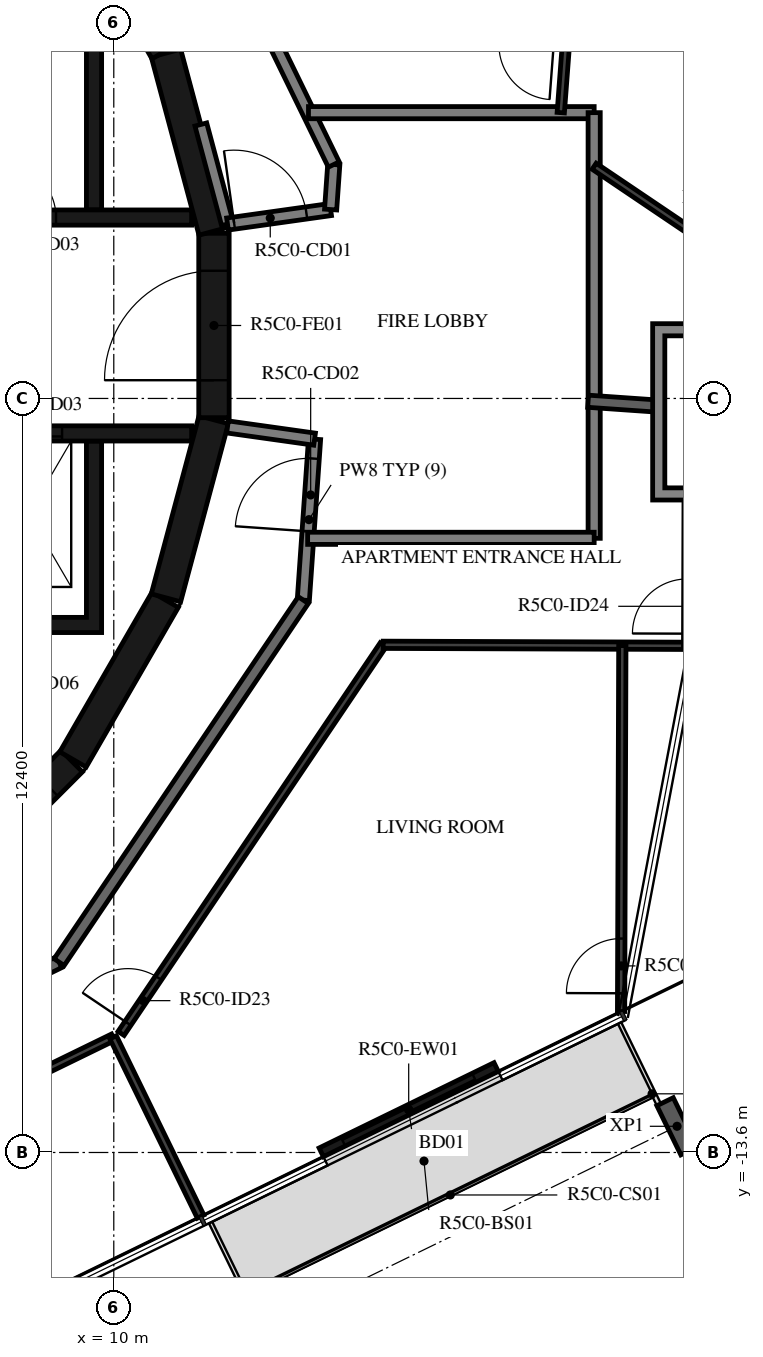
"""IFC4 building model, lengths in metres.
Left out: names, types, materials, properties, quantities, classifications, styles, units other than length and angle.
Written with IfcOpenShell. Run it as: python <this file> out.ifc"""

import sys

from ifc_helpers import new_model, si_unit, direction, frame, frame_2d, origin, origin_2d, place, context, subcontext, project, spatial, polyline, rectangle, i_section, outline, extrude, element, fill, save


model = new_model("IFC4")
c1 = context("Model", 3, precision=1e-05, world=origin(), true_north=direction((0.0, 1.0)))
c2 = subcontext(c1, "Body", "Model", "MODEL_VIEW")
j1 = project(units=[si_unit("LENGTHUNIT", "METRE"), si_unit("PLANEANGLEUNIT", "RADIAN")], contexts=[c1])
p1 = place(None, origin())
s1 = spatial("IfcSite", under=j1, at=p1, CompositionType="ELEMENT")
p2 = place(p1, origin())
s2 = spatial("IfcBuilding", under=s1, at=p2, CompositionType="ELEMENT")
p3 = place(p2, frame((0.0, 0.0, 216.4)))
s3 = spatial("IfcBuildingStorey", under=s2, at=p3, CompositionType="ELEMENT", Elevation=216.4)
p4 = place(p3, frame((19.263, -13.169, -0.38), z_axis=(0.0, 0.0, 1.0), x_axis=(-0.898794095235, -0.438371046456, 0.0)))
e1 = element("IfcColumn", 1, at=p4, inside=s3, PredefinedType="COLUMN", context=c2, shape_type="SweptSolid", body=[
    extrude(i_section(OverallWidth=0.3, OverallDepth=0.9, WebThickness=0.019, FlangeThickness=0.035, FilletRadius=0.03, at=origin_2d()), origin(), (0.0, 0.0, 1.0), 2.616),
])
p5 = place(p3, frame((13.412, -13.598, 0.0), z_axis=(0.0, 0.0, 1.0), x_axis=(0.898793373747, 0.438372525723, 0.0)))
e2 = element("IfcWall", 2, at=p5, inside=s3, PredefinedType="STANDARD", context=c2, shape_type="SweptSolid", body=[
    extrude(rectangle(XDim=3.2, YDim=0.16, at=frame_2d((1.6, 0.0))), origin(), (0.0, 0.0, 1.0), 3.05),
])
p6 = place(p5, frame((0.4, 0.0, 0.0)))
e3 = element("IfcOpeningElement", 3, at=p6, cuts=e2, PredefinedType="OPENING", context=c2, shape_type="SweptSolid", body=[
    extrude(rectangle(XDim=2.4, YDim=2.4, at=frame_2d((1.2, 1.2))), frame((0.0, 0.09, 0.0), z_axis=(0.0, -1.0, 0.0), x_axis=(1.0, 0.0, 0.0)), (0.0, 0.0, 1.0), 0.18),
])
p7 = place(p3, frame((7.164, -9.308, 0.0), z_axis=(0.0, 0.0, 1.0), x_axis=(0.707106781187, 0.707106781187, 0.0)))
e4 = element("IfcWall", 4, at=p7, inside=s3, PredefinedType="SHEAR", context=c2, shape_type="SweptSolid", body=[
    extrude(rectangle(XDim=3.032, YDim=0.5, at=frame_2d((1.516, 0.0))), origin(), (0.0, 0.0, 1.0), 3.05),
])
p8 = place(p7, frame((1.566, 0.0, 0.0)))
e5 = element("IfcOpeningElement", 5, at=p8, cuts=e4, PredefinedType="OPENING", context=c2, shape_type="SweptSolid", body=[
    extrude(rectangle(XDim=0.9, YDim=2.1, at=frame_2d((0.45, 1.05))), frame((0.0, 0.26, 0.0), z_axis=(0.0, -1.0, 0.0), x_axis=(1.0, 0.0, 0.0)), (0.0, 0.0, 1.0), 0.52),
])
for number, where, z_axis, x_axis in (
    (6, (9.329, -7.137, 0.0), (0.0, 0.0, 1.0), (0.5, 0.866, 0.0)),
    (7, (10.858, -4.479, 0.0), (0.0, 0.0, 1.0), (0.259, 0.966, 0.0)),
):
    element("IfcWall", number, at=place(p3, frame(where, z_axis=z_axis, x_axis=x_axis)), inside=s3, PredefinedType="SHEAR", context=c2, shape_type="SweptSolid", body=[
        extrude(rectangle(XDim=3.033, YDim=0.5, at=frame_2d((1.516, 0.0))), origin(), (0.0, 0.0, 1.0), 3.05),
    ])
p9 = place(p3, frame((11.647, -1.516, 0.0), z_axis=(0.0, 0.0, 1.0), x_axis=(0.0, 1.0, 0.0)))
e8 = element("IfcWall", 8, at=p9, inside=s3, PredefinedType="SHEAR", context=c2, shape_type="SweptSolid", body=[
    extrude(rectangle(XDim=3.033, YDim=0.5, at=frame_2d((1.516, 0.0))), origin(), (0.0, 0.0, 1.0), 3.05),
])
p10 = place(p9, frame((0.616, 0.0, 0.0)))
e9 = element("IfcOpeningElement", 9, at=p10, cuts=e8, PredefinedType="OPENING", context=c2, shape_type="SweptSolid", body=[
    extrude(rectangle(XDim=1.8, YDim=2.1, at=frame_2d((0.9, 1.05))), frame((0.0, 0.26, 0.0), z_axis=(0.0, -1.0, 0.0), x_axis=(1.0, 0.0, 0.0)), (0.0, 0.0, 1.0), 0.52),
])
for number, where, z_axis, x_axis in (
    (10, (11.643, 1.55, 0.0), (0.0, 0.0, 1.0), (-0.259, 0.966, 0.0)),
    (11, (10.845, 4.51, 0.0), (0.0, 0.0, 1.0), (-0.5, 0.866, 0.0)),
):
    element("IfcWall", number, at=place(p3, frame(where, z_axis=z_axis, x_axis=x_axis)), inside=s3, PredefinedType="SHEAR", context=c2, shape_type="SweptSolid", body=[
        extrude(rectangle(XDim=3.033, YDim=0.5, at=frame_2d((1.516, 0.0))), origin(), (0.0, 0.0, 1.0), 3.05),
    ])
p11 = place(p3, origin())
e12 = element("IfcWall", 12, at=p11, inside=s3, PredefinedType="SHEAR", context=c2, shape_type="SweptSolid", body=[
    extrude(outline(polyline([(-9.55, 4.8), (-5.5, 4.8), (-5.5, 1.9), (-5.25, 1.9), (-5.25, 4.8), (-1.2, 4.8), (-1.2, 1.9), (-0.95, 1.9), (-0.95, 4.8), (0.95, 4.8), (0.95, 1.9), (1.2, 1.9), (1.2, 4.8), (3.1, 4.8), (3.1, 1.9), (3.35, 1.9), (3.35, 4.8), (5.25, 4.8), (5.25, 1.9), (5.5, 1.9), (5.5, 4.8), (7.4, 4.8), (7.4, 1.9), (7.65, 1.9), (7.65, 4.8), (9.55, 4.8), (9.55, 1.9), (9.8, 1.9), (9.8, 4.8), (9.8, 5.05), (-9.8, 5.05), (-9.8, 4.8), (-9.8, 1.9), (-9.55, 1.9), (-9.55, 4.8)])), origin(), (0.0, 0.0, 1.0), 3.05),
])
p12 = place(p3, origin())
e13 = element("IfcWall", 13, at=p12, inside=s3, PredefinedType="SHEAR", context=c2, shape_type="SweptSolid", body=[
    extrude(outline(polyline([(9.8, -5.05), (9.8, -4.8), (9.8, -1.9), (9.55, -1.9), (9.55, -4.8), (7.65, -4.8), (7.65, -1.9), (7.4, -1.9), (7.4, -4.8), (5.5, -4.8), (5.5, -1.9), (5.25, -1.9), (5.25, -4.8), (3.35, -4.8), (3.35, -1.9), (3.1, -1.9), (3.1, -4.8), (1.2, -4.8), (1.2, -1.9), (0.95, -1.9), (0.95, -4.8), (-5.25, -4.8), (-5.25, -1.9), (-5.5, -1.9), (-5.5, -4.8), (-7.4, -4.8), (-7.4, -1.9), (-7.65, -1.9), (-7.65, -4.8), (-9.55, -4.8), (-9.55, -1.9), (-9.8, -1.9), (-9.8, -4.8), (-9.8, -5.05), (9.8, -5.05)])), origin(), (0.0, 0.0, 1.0), 3.05),
])
p13 = place(p3, frame((3.35, 1.775, 0.0), z_axis=(0.0, 0.0, 1.0), x_axis=(1.0, 0.0, 0.0)))
e14 = element("IfcWall", 14, at=p13, inside=s3, PredefinedType="SHEAR", context=c2, shape_type="SweptSolid", body=[
    extrude(rectangle(XDim=7.93, YDim=0.25, at=frame_2d((3.965, 0.0))), origin(), (0.0, 0.0, 1.0), 3.05),
])
p14 = place(p13, frame((0.35, 0.0, 0.0)))
e15 = element("IfcOpeningElement", 15, at=p14, cuts=e14, PredefinedType="OPENING", context=c2, shape_type="SweptSolid", body=[
    extrude(rectangle(XDim=1.2, YDim=2.4, at=frame_2d((0.6, 1.2))), frame((0.0, 0.135, 0.0), z_axis=(0.0, -1.0, 0.0), x_axis=(1.0, 0.0, 0.0)), (0.0, 0.0, 1.0), 0.27),
])
p15 = place(p13, frame((2.5, 0.0, 0.0)))
e16 = element("IfcOpeningElement", 16, at=p15, cuts=e14, PredefinedType="OPENING", context=c2, shape_type="SweptSolid", body=[
    extrude(rectangle(XDim=1.2, YDim=2.4, at=frame_2d((0.6, 1.2))), frame((0.0, 0.135, 0.0), z_axis=(0.0, -1.0, 0.0), x_axis=(1.0, 0.0, 0.0)), (0.0, 0.0, 1.0), 0.27),
])
p16 = place(p13, frame((4.8, 0.0, 0.0)))
e17 = element("IfcOpeningElement", 17, at=p16, cuts=e14, PredefinedType="OPENING", context=c2, shape_type="SweptSolid", body=[
    extrude(rectangle(XDim=0.9, YDim=2.1, at=frame_2d((0.45, 1.05))), frame((0.0, 0.135, 0.0), z_axis=(0.0, -1.0, 0.0), x_axis=(1.0, 0.0, 0.0)), (0.0, 0.0, 1.0), 0.27),
])
p17 = place(p3, frame((3.35, -1.775, 0.0), z_axis=(0.0, 0.0, 1.0), x_axis=(1.0, 0.0, 0.0)))
e18 = element("IfcWall", 18, at=p17, inside=s3, PredefinedType="SHEAR", context=c2, shape_type="SweptSolid", body=[
    extrude(rectangle(XDim=7.93, YDim=0.25, at=frame_2d((3.965, 0.0))), origin(), (0.0, 0.0, 1.0), 3.05),
])
p18 = place(p17, frame((0.4, 0.0, 0.0)))
e19 = element("IfcOpeningElement", 19, at=p18, cuts=e18, PredefinedType="OPENING", context=c2, shape_type="SweptSolid", body=[
    extrude(rectangle(XDim=1.1, YDim=2.4, at=frame_2d((0.55, 1.2))), frame((0.0, 0.135, 0.0), z_axis=(0.0, -1.0, 0.0), x_axis=(1.0, 0.0, 0.0)), (0.0, 0.0, 1.0), 0.27),
])
p19 = place(p17, frame((2.55, 0.0, 0.0)))
e20 = element("IfcOpeningElement", 20, at=p19, cuts=e18, PredefinedType="OPENING", context=c2, shape_type="SweptSolid", body=[
    extrude(rectangle(XDim=1.1, YDim=2.4, at=frame_2d((0.55, 1.2))), frame((0.0, 0.135, 0.0), z_axis=(0.0, -1.0, 0.0), x_axis=(1.0, 0.0, 0.0)), (0.0, 0.0, 1.0), 0.27),
])
p20 = place(p17, frame((4.7, 0.0, 0.0)))
e21 = element("IfcOpeningElement", 21, at=p20, cuts=e18, PredefinedType="OPENING", context=c2, shape_type="SweptSolid", body=[
    extrude(rectangle(XDim=1.1, YDim=2.4, at=frame_2d((0.55, 1.2))), frame((0.0, 0.135, 0.0), z_axis=(0.0, -1.0, 0.0), x_axis=(1.0, 0.0, 0.0)), (0.0, 0.0, 1.0), 0.27),
])
p21 = place(p3, frame((11.87, 1.668, 0.0), z_axis=(0.0, 0.0, 1.0), x_axis=(-0.258836880648, 0.965921047093, 0.0)))
e22 = element("IfcWall", 22, at=p21, inside=s3, PredefinedType="STANDARD", context=c2, shape_type="SweptSolid", body=[
    extrude(rectangle(XDim=1.695, YDim=0.2, at=frame_2d((0.848, 0.0))), origin(), (0.0, 0.0, 1.0), 3.05),
])
p22 = place(p3, frame((11.87, 1.668, 0.0), z_axis=(0.0, 0.0, 1.0), x_axis=(0.990271931984, 0.139145609792, 0.0)))
e23 = element("IfcWall", 23, at=p22, inside=s3, PredefinedType="STANDARD", context=c2, shape_type="SweptSolid", body=[
    extrude(rectangle(XDim=1.712, YDim=0.2, at=frame_2d((0.856, 0.0))), origin(), (0.0, 0.0, 1.0), 3.05),
])
p23 = place(p22, frame((0.11, 0.0, 0.0)))
e24 = element("IfcOpeningElement", 24, at=p23, cuts=e23, PredefinedType="OPENING", context=c2, shape_type="SweptSolid", body=[
    extrude(rectangle(XDim=1.2, YDim=2.1, at=frame_2d((0.6, 1.05))), frame((0.0, 0.11, 0.0), z_axis=(0.0, -1.0, 0.0), x_axis=(1.0, 0.0, 0.0)), (0.0, 0.0, 1.0), 0.22),
])
p24 = place(p3, frame((13.566, 1.906, 0.0), z_axis=(0.0, 0.0, 1.0), x_axis=(0.07005495793, 0.997543133338, 0.0)))
e25 = element("IfcWall", 25, at=p24, inside=s3, PredefinedType="STANDARD", context=c2, shape_type="SweptSolid", body=[
    extrude(rectangle(XDim=0.742, YDim=0.2, at=frame_2d((0.371, 0.0))), origin(), (0.0, 0.0, 1.0), 3.05),
])
p25 = place(p3, frame((13.618, 2.647, 0.0), z_axis=(0.0, 0.0, 1.0), x_axis=(-0.438366026218, 0.898796543751, 0.0)))
e26 = element("IfcWall", 26, at=p25, inside=s3, PredefinedType="STANDARD", context=c2, shape_type="SweptSolid", body=[
    extrude(rectangle(XDim=7.181, YDim=0.2, at=frame_2d((3.591, 0.0))), origin(), (0.0, 0.0, 1.0), 3.05),
])
p26 = place(p3, frame((13.117, -4.517, 0.0), z_axis=(0.0, 0.0, 1.0), x_axis=(0.069736659613, 0.997565435601, 0.0)))
e27 = element("IfcWall", 27, at=p26, inside=s3, PredefinedType="STANDARD", context=c2, shape_type="SweptSolid", body=[
    extrude(rectangle(XDim=2.654, YDim=0.2, at=frame_2d((1.327, 0.0))), origin(), (0.0, 0.0, 1.0), 3.05),
])
p27 = place(p26, frame((1.134, 0.0, 0.0)))
e28 = element("IfcOpeningElement", 28, at=p27, cuts=e27, PredefinedType="OPENING", context=c2, shape_type="SweptSolid", body=[
    extrude(rectangle(XDim=1.2, YDim=2.1, at=frame_2d((0.6, 1.05))), frame((0.0, 0.11, 0.0), z_axis=(0.0, -1.0, 0.0), x_axis=(1.0, 0.0, 0.0)), (0.0, 0.0, 1.0), 0.22),
])
p28 = place(p3, frame((13.302, -1.869, 0.0), z_axis=(0.0, 0.0, 1.0), x_axis=(-0.990274397042, 0.13912806533, 0.0)))
e29 = element("IfcWall", 29, at=p28, inside=s3, PredefinedType="STANDARD", context=c2, shape_type="SweptSolid", body=[
    extrude(rectangle(XDim=1.446, YDim=0.2, at=frame_2d((0.723, 0.0))), origin(), (0.0, 0.0, 1.0), 3.05),
])
p29 = place(p3, frame((2.647, -13.618, 0.0), z_axis=(0.0, 0.0, 1.0), x_axis=(0.898796543751, 0.438366026218, 0.0)))
e30 = element("IfcWall", 30, at=p29, inside=s3, PredefinedType="STANDARD", context=c2, shape_type="SweptSolid", body=[
    extrude(rectangle(XDim=7.181, YDim=0.2, at=frame_2d((3.591, 0.0))), origin(), (0.0, 0.0, 1.0), 3.05),
])
p30 = place(p29, frame((0.2, 0.0, 0.0)))
e31 = element("IfcOpeningElement", 31, at=p30, cuts=e30, PredefinedType="OPENING", context=c2, shape_type="SweptSolid", body=[
    extrude(rectangle(XDim=1.0, YDim=2.1, at=frame_2d((0.5, 1.05))), frame((0.0, 0.11, 0.0), z_axis=(0.0, -1.0, 0.0), x_axis=(1.0, 0.0, 0.0)), (0.0, 0.0, 1.0), 0.22),
])
p31 = place(p3, frame((9.101, -10.47, 0.0), z_axis=(0.0, 0.0, 1.0), x_axis=(0.559195469534, 0.829035841718, 0.0)))
e32 = element("IfcWall", 32, at=p31, inside=s3, PredefinedType="STANDARD", context=c2, shape_type="SweptSolid", body=[
    extrude(rectangle(XDim=7.181, YDim=0.2, at=frame_2d((3.591, 0.0))), origin(), (0.0, 0.0, 1.0), 3.05),
])
p32 = place(p3, frame((17.9, 3.5, 0.0), z_axis=(0.0, 0.0, 1.0), x_axis=(-1.0, 0.0, 0.0)))
e33 = element("IfcWall", 33, at=p32, inside=s3, PredefinedType="STANDARD", context=c2, shape_type="SweptSolid", body=[
    extrude(rectangle(XDim=4.698, YDim=0.2, at=frame_2d((2.349, 0.0))), origin(), (0.0, 0.0, 1.0), 3.05),
])
p33 = place(p3, frame((17.9, -3.5, 0.0), z_axis=(0.0, 0.0, 1.0), x_axis=(0.0, 1.0, 0.0)))
e34 = element("IfcWall", 34, at=p33, inside=s3, PredefinedType="STANDARD", context=c2, shape_type="SweptSolid", body=[
    extrude(rectangle(XDim=7.0, YDim=0.2, at=frame_2d((3.5, 0.0))), origin(), (0.0, 0.0, 1.0), 3.05),
])
p34 = place(p3, frame((13.188, -3.5, 0.0), z_axis=(0.0, 0.0, 1.0), x_axis=(1.0, 0.0, 0.0)))
e35 = element("IfcWall", 35, at=p34, inside=s3, PredefinedType="STANDARD", context=c2, shape_type="SweptSolid", body=[
    extrude(rectangle(XDim=4.712, YDim=0.2, at=frame_2d((2.356, 0.0))), origin(), (0.0, 0.0, 1.0), 3.05),
])
p35 = place(p3, frame((17.8, -1.246, 0.0), z_axis=(0.0, 0.0, 1.0), x_axis=(0.997562681713, -0.069776042122, 0.0)))
e36 = element("IfcWall", 36, at=p35, inside=s3, PredefinedType="STANDARD", context=c2, shape_type="SweptSolid", body=[
    extrude(rectangle(XDim=1.144, YDim=0.2, at=frame_2d((0.572, 0.0))), origin(), (0.0, 0.0, 1.0), 3.05),
])
p36 = place(p3, frame((17.351, 3.5, 0.0), z_axis=(0.0, 0.0, 1.0), x_axis=(0.075374124137, 0.997155324616, 0.0)))
e37 = element("IfcWall", 37, at=p36, inside=s3, PredefinedType="PARTITIONING", context=c2, shape_type="SweptSolid", body=[
    extrude(rectangle(XDim=1.101, YDim=0.12, at=frame_2d((0.551, 0.0))), origin(), (0.0, 0.0, 1.0), 3.05),
])
p37 = place(p3, frame((21.141, 0.433, 0.0), z_axis=(0.0, 0.0, 1.0), x_axis=(-0.829049908454, 0.559174614313, 0.0)))
e38 = element("IfcWall", 38, at=p37, inside=s3, PredefinedType="PARTITIONING", context=c2, shape_type="SweptSolid", body=[
    extrude(rectangle(XDim=3.909, YDim=0.12, at=frame_2d((1.955, 0.0))), origin(), (0.0, 0.0, 1.0), 3.05),
])
p38 = place(p37, frame((0.8, 0.0, 0.0)))
e39 = element("IfcOpeningElement", 39, at=p38, cuts=e38, PredefinedType="OPENING", context=c2, shape_type="SweptSolid", body=[
    extrude(rectangle(XDim=0.8, YDim=2.1, at=frame_2d((0.4, 1.05))), frame((0.0, 0.07, 0.0), z_axis=(0.0, -1.0, 0.0), x_axis=(1.0, 0.0, 0.0)), (0.0, 0.0, 1.0), 0.14),
])
p39 = place(p3, frame((3.074, -15.078, 0.0), z_axis=(0.0, 0.0, 1.0), x_axis=(0.898800770739, 0.438357359377, 0.0)))
e40 = element("IfcWall", 40, at=p39, inside=s3, PredefinedType="PARTITIONING", context=c2, shape_type="SweptSolid", body=[
    extrude(rectangle(XDim=7.694, YDim=0.12, at=frame_2d((3.847, 0.0))), origin(), (0.0, 0.0, 1.0), 3.05),
])
p40 = place(p39, frame((0.2, 0.0, 0.0)))
e41 = element("IfcOpeningElement", 41, at=p40, cuts=e40, PredefinedType="OPENING", context=c2, shape_type="SweptSolid", body=[
    extrude(rectangle(XDim=0.9, YDim=2.1, at=frame_2d((0.45, 1.05))), frame((0.0, 0.07, 0.0), z_axis=(0.0, -1.0, 0.0), x_axis=(1.0, 0.0, 0.0)), (0.0, 0.0, 1.0), 0.14),
])
p41 = place(p3, frame((10.12, -11.642, 0.0), z_axis=(0.0, 0.0, 1.0), x_axis=(0.559201404667, 0.829031838362, 0.0)))
e42 = element("IfcWall", 42, at=p41, inside=s3, PredefinedType="PARTITIONING", context=c2, shape_type="SweptSolid", body=[
    extrude(rectangle(XDim=7.709, YDim=0.12, at=frame_2d((3.854, 0.0))), origin(), (0.0, 0.0, 1.0), 3.05),
])
p42 = place(p41, frame((0.2, 0.0, 0.0)))
e43 = element("IfcOpeningElement", 43, at=p42, cuts=e42, PredefinedType="OPENING", context=c2, shape_type="SweptSolid", body=[
    extrude(rectangle(XDim=0.9, YDim=2.1, at=frame_2d((0.45, 1.05))), frame((0.0, 0.07, 0.0), z_axis=(0.0, -1.0, 0.0), x_axis=(1.0, 0.0, 0.0)), (0.0, 0.0, 1.0), 0.14),
])
p43 = place(p3, frame((14.431, -5.251, 0.0), z_axis=(0.0, 0.0, 1.0), x_axis=(0.999994153659, -0.003419451456, 0.0)))
e44 = element("IfcWall", 44, at=p43, inside=s3, PredefinedType="PARTITIONING", context=c2, shape_type="SweptSolid", body=[
    extrude(rectangle(XDim=4.998, YDim=0.12, at=frame_2d((2.499, 0.0))), origin(), (0.0, 0.0, 1.0), 3.05),
])
p44 = place(p3, frame((11.427, -14.654, 0.0), z_axis=(0.0, 0.0, 1.0), x_axis=(-0.438410435857, 0.898774882677, 0.0)))
e45 = element("IfcWall", 45, at=p44, inside=s3, PredefinedType="PARTITIONING", context=c2, shape_type="SweptSolid", body=[
    extrude(rectangle(XDim=3.281, YDim=0.12, at=frame_2d((1.64, 0.0))), origin(), (0.0, 0.0, 1.0), 3.05),
])
p45 = place(p3, frame((18.343, -11.282, 0.0), z_axis=(0.0, 0.0, 1.0), x_axis=(0.003448675073, 0.999994053302, 0.0)))
e46 = element("IfcWall", 46, at=p45, inside=s3, PredefinedType="PARTITIONING", context=c2, shape_type="SweptSolid", body=[
    extrude(rectangle(XDim=6.017, YDim=0.12, at=frame_2d((3.009, 0.0))), origin(), (0.0, 0.0, 1.0), 3.05),
])
p46 = place(p45, frame((0.3, 0.0, 0.0)))
e47 = element("IfcOpeningElement", 47, at=p46, cuts=e46, PredefinedType="OPENING", context=c2, shape_type="SweptSolid", body=[
    extrude(rectangle(XDim=0.9, YDim=2.1, at=frame_2d((0.45, 1.05))), frame((0.0, 0.07, 0.0), z_axis=(0.0, -1.0, 0.0), x_axis=(1.0, 0.0, 0.0)), (0.0, 0.0, 1.0), 0.14),
])
p47 = place(p3, origin())
e48 = element("IfcWall", 48, at=p47, inside=s3, PredefinedType="STANDARD", context=c2, shape_type="SweptSolid", body=[
    extrude(outline(polyline([(21.762, 0.03), (21.762, -2.87), (18.862, -2.87), (18.862, 0.03), (21.762, 0.03)]), holes=[polyline([(19.062, -2.67), (21.562, -2.67), (21.562, -0.17), (19.062, -0.17), (19.062, -2.67)])]), origin(), (0.0, 0.0, 1.0), 3.05),
])
p48 = place(p6, origin())
e49 = element("IfcDoor", 49, at=p48, inside=s3, OperationType="DOUBLE_DOOR_SLIDING", PredefinedType="DOOR", context=c2, shape_type="SweptSolid", body=[
    extrude(rectangle(XDim=2.4, YDim=2.4, at=frame_2d((1.2, 1.2))), frame((0.0, 0.025, 0.0), z_axis=(0.0, -1.0, 0.0), x_axis=(1.0, 0.0, 0.0)), (0.0, 0.0, 1.0), 0.05),
])
fill(e3, e49)
p49 = place(p10, origin())
e50 = element("IfcDoor", 50, at=p49, inside=s3, OperationType="DOUBLE_DOOR_SINGLE_SWING", PredefinedType="DOOR", context=c2, shape_type="SweptSolid", body=[
    extrude(rectangle(XDim=1.8, YDim=2.1, at=frame_2d((0.9, 1.05))), frame((0.0, 0.025, 0.0), z_axis=(0.0, -1.0, 0.0), x_axis=(1.0, 0.0, 0.0)), (0.0, 0.0, 1.0), 0.05),
])
fill(e9, e50)
p50 = place(p20, origin())
e51 = element("IfcDoor", 51, at=p50, inside=s3, OperationType="DOUBLE_DOOR_SLIDING", PredefinedType="DOOR", context=c2, shape_type="SweptSolid", body=[
    extrude(rectangle(XDim=1.1, YDim=2.4, at=frame_2d((0.55, 1.2))), frame((0.0, 0.025, 0.0), z_axis=(0.0, -1.0, 0.0), x_axis=(1.0, 0.0, 0.0)), (0.0, 0.0, 1.0), 0.05),
])
fill(e21, e51)
p51 = place(p16, origin())
e52 = element("IfcDoor", 52, at=p51, inside=s3, OperationType="SINGLE_SWING_LEFT", PredefinedType="DOOR", context=c2, shape_type="SweptSolid", body=[
    extrude(rectangle(XDim=0.9, YDim=2.1, at=frame_2d((0.45, 1.05))), frame((0.0, 0.025, 0.0), z_axis=(0.0, -1.0, 0.0), x_axis=(1.0, 0.0, 0.0)), (0.0, 0.0, 1.0), 0.05),
])
fill(e17, e52)
p52 = place(p42, origin())
e53 = element("IfcDoor", 53, at=p52, inside=s3, OperationType="SINGLE_SWING_RIGHT", PredefinedType="DOOR", context=c2, shape_type="SweptSolid", body=[
    extrude(rectangle(XDim=0.9, YDim=2.1, at=frame_2d((0.45, 1.05))), frame((0.0, 0.025, 0.0), z_axis=(0.0, -1.0, 0.0), x_axis=(1.0, 0.0, 0.0)), (0.0, 0.0, 1.0), 0.05),
])
fill(e43, e53)
p53 = place(p46, origin())
e54 = element("IfcDoor", 54, at=p53, inside=s3, OperationType="SINGLE_SWING_RIGHT", PredefinedType="DOOR", context=c2, shape_type="SweptSolid", body=[
    extrude(rectangle(XDim=0.9, YDim=2.1, at=frame_2d((0.45, 1.05))), frame((0.0, 0.025, 0.0), z_axis=(0.0, -1.0, 0.0), x_axis=(1.0, 0.0, 0.0)), (0.0, 0.0, 1.0), 0.05),
])
fill(e47, e54)
p54 = place(p23, origin())
e55 = element("IfcDoor", 55, at=p54, inside=s3, OperationType="DOUBLE_DOOR_SINGLE_SWING", PredefinedType="DOOR", context=c2, shape_type="SweptSolid", body=[
    extrude(rectangle(XDim=1.2, YDim=2.1, at=frame_2d((0.6, 1.05))), frame((0.0, 0.025, 0.0), z_axis=(0.0, -1.0, 0.0), x_axis=(1.0, 0.0, 0.0)), (0.0, 0.0, 1.0), 0.05),
])
fill(e24, e55)
p55 = place(p27, origin())
e56 = element("IfcDoor", 56, at=p55, inside=s3, OperationType="DOUBLE_DOOR_SINGLE_SWING", PredefinedType="DOOR", context=c2, shape_type="SweptSolid", body=[
    extrude(rectangle(XDim=1.2, YDim=2.1, at=frame_2d((0.6, 1.05))), frame((0.0, 0.025, 0.0), z_axis=(0.0, -1.0, 0.0), x_axis=(1.0, 0.0, 0.0)), (0.0, 0.0, 1.0), 0.05),
])
fill(e28, e56)
save(model, sys.argv[1])
